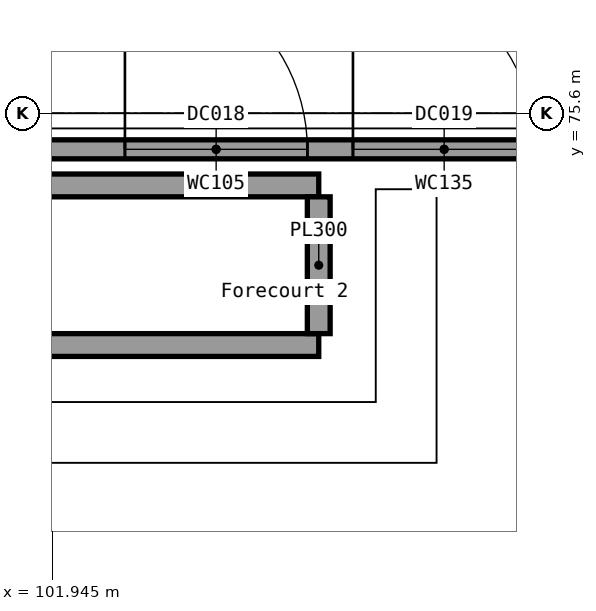
"""IFC4 building model, lengths in metres.
Left out: names, types, materials, properties, quantities, classifications, styles, units other than length and angle.
Written with IfcOpenShell. Run it as: python <this file> out.ifc"""

import sys

from ifc_helpers import new_model, si_unit, direction, frame, frame_2d, origin, place, context, subcontext, project, spatial, rectangle, extrude, element, fill, save


model = new_model("IFC4")
c1 = context("Model", 3, precision=1e-05, world=origin(), true_north=direction((0.0, 1.0)))
c2 = subcontext(c1, "Body", "Model", "MODEL_VIEW")
j1 = project(units=[si_unit("LENGTHUNIT", "METRE"), si_unit("PLANEANGLEUNIT", "RADIAN")], contexts=[c1])
p1 = place(None, origin())
s1 = spatial("IfcSite", under=j1, at=p1, CompositionType="ELEMENT")
p2 = place(p1, origin())
s2 = spatial("IfcBuilding", under=s1, at=p2, CompositionType="ELEMENT")
p3 = place(p2, origin())
s3 = spatial("IfcBuildingStorey", under=s2, at=p3, CompositionType="ELEMENT", Elevation=0.0)
for number, where, z_axis, x_axis in (
    (1, (93.75, 72.55, 0.0), (0.0, 0.0, 1.0), (1.0, 0.0, 0.0)),
    (2, (93.75, 74.65, 0.0), (0.0, 0.0, 1.0), (1.0, 0.0, 0.0)),
):
    element("IfcWall", number, at=place(p3, frame(where, z_axis=z_axis, x_axis=x_axis)), inside=s3, PredefinedType="SOLIDWALL", context=c2, shape_type="SweptSolid", body=[
        extrude(rectangle(XDim=11.7, YDim=0.3, at=frame_2d((5.85, 0.0))), origin(), (0.0, 0.0, 1.0), 0.9),
    ])
p4 = place(p3, frame((105.45, 72.7, 0.0), z_axis=(0.0, 0.0, 1.0), x_axis=(0.0, 1.0, 0.0)))
e3 = element("IfcWall", 3, at=p4, inside=s3, PredefinedType="SOLIDWALL", context=c2, shape_type="SweptSolid", body=[
    extrude(rectangle(XDim=1.8, YDim=0.3, at=frame_2d((0.9, 0.0))), origin(), (0.0, 0.0, 1.0), 0.9),
])
p5 = place(p3, frame((92.4, 75.125, 0.0), z_axis=(0.0, 0.0, 1.0), x_axis=(1.0, 0.0, 0.0)))
e4 = element("IfcWall", 4, at=p5, inside=s3, PredefinedType="SOLIDWALL", context=c2, shape_type="SweptSolid", body=[
    extrude(rectangle(XDim=16.8, YDim=0.25, at=frame_2d((8.4, 0.0))), origin(), (0.0, 0.0, 1.0), 6.0),
])
p6 = place(p5, frame((0.9, 0.0, 0.0)))
e5 = element("IfcOpeningElement", 5, at=p6, cuts=e4, PredefinedType="OPENING", context=c2, shape_type="SweptSolid", body=[
    extrude(rectangle(XDim=2.4, YDim=2.4, at=frame_2d((1.2, 1.2))), frame((0.0, 0.125, 0.0), z_axis=(0.0, -1.0, 0.0), x_axis=(1.0, 0.0, 0.0)), (0.0, 0.0, 1.0), 0.25),
])
p7 = place(p5, frame((0.9, 0.0, 3.0)))
e6 = element("IfcOpeningElement", 6, at=p7, cuts=e4, PredefinedType="OPENING", context=c2, shape_type="SweptSolid", body=[
    extrude(rectangle(XDim=2.4, YDim=2.4, at=frame_2d((1.2, 1.2))), frame((0.0, 0.125, 0.0), z_axis=(0.0, -1.0, 0.0), x_axis=(1.0, 0.0, 0.0)), (0.0, 0.0, 1.0), 0.25),
])
p8 = place(p5, frame((3.9, 0.0, 0.0)))
e7 = element("IfcOpeningElement", 7, at=p8, cuts=e4, PredefinedType="OPENING", context=c2, shape_type="SweptSolid", body=[
    extrude(rectangle(XDim=2.4, YDim=2.4, at=frame_2d((1.2, 1.2))), frame((0.0, 0.125, 0.0), z_axis=(0.0, -1.0, 0.0), x_axis=(1.0, 0.0, 0.0)), (0.0, 0.0, 1.0), 0.25),
])
p9 = place(p5, frame((3.9, 0.0, 3.0)))
e8 = element("IfcOpeningElement", 8, at=p9, cuts=e4, PredefinedType="OPENING", context=c2, shape_type="SweptSolid", body=[
    extrude(rectangle(XDim=2.4, YDim=2.4, at=frame_2d((1.2, 1.2))), frame((0.0, 0.125, 0.0), z_axis=(0.0, -1.0, 0.0), x_axis=(1.0, 0.0, 0.0)), (0.0, 0.0, 1.0), 0.25),
])
p10 = place(p5, frame((10.5, 0.0, 0.0)))
e9 = element("IfcOpeningElement", 9, at=p10, cuts=e4, PredefinedType="OPENING", context=c2, shape_type="SweptSolid", body=[
    extrude(rectangle(XDim=2.4, YDim=2.4, at=frame_2d((1.2, 1.2))), frame((0.0, 0.125, 0.0), z_axis=(0.0, -1.0, 0.0), x_axis=(1.0, 0.0, 0.0)), (0.0, 0.0, 1.0), 0.25),
])
p11 = place(p5, frame((10.5, 0.0, 3.0)))
e10 = element("IfcOpeningElement", 10, at=p11, cuts=e4, PredefinedType="OPENING", context=c2, shape_type="SweptSolid", body=[
    extrude(rectangle(XDim=2.4, YDim=2.4, at=frame_2d((1.2, 1.2))), frame((0.0, 0.125, 0.0), z_axis=(0.0, -1.0, 0.0), x_axis=(1.0, 0.0, 0.0)), (0.0, 0.0, 1.0), 0.25),
])
p12 = place(p5, frame((13.5, 0.0, 0.0)))
e11 = element("IfcOpeningElement", 11, at=p12, cuts=e4, PredefinedType="OPENING", context=c2, shape_type="SweptSolid", body=[
    extrude(rectangle(XDim=2.4, YDim=2.4, at=frame_2d((1.2, 1.2))), frame((0.0, 0.125, 0.0), z_axis=(0.0, -1.0, 0.0), x_axis=(1.0, 0.0, 0.0)), (0.0, 0.0, 1.0), 0.25),
])
p13 = place(p5, frame((13.5, 0.0, 3.0)))
e12 = element("IfcOpeningElement", 12, at=p13, cuts=e4, PredefinedType="OPENING", context=c2, shape_type="SweptSolid", body=[
    extrude(rectangle(XDim=2.4, YDim=2.4, at=frame_2d((1.2, 1.2))), frame((0.0, 0.125, 0.0), z_axis=(0.0, -1.0, 0.0), x_axis=(1.0, 0.0, 0.0)), (0.0, 0.0, 1.0), 0.25),
])
p14 = place(p10, origin())
e13 = element("IfcDoor", 13, at=p14, inside=s3, OperationType="DOUBLE_DOOR_DOUBLE_SWING", PredefinedType="DOOR", context=c2, shape_type="SweptSolid", body=[
    extrude(rectangle(XDim=2.4, YDim=2.4, at=frame_2d((1.2, 1.2))), frame((0.0, 0.025, 0.0), z_axis=(0.0, -1.0, 0.0), x_axis=(1.0, 0.0, 0.0)), (0.0, 0.0, 1.0), 0.05),
])
fill(e9, e13)
p15 = place(p11, origin())
e14 = element("IfcWindow", 14, at=p15, inside=s3, PartitioningType="SINGLE_PANEL", PredefinedType="WINDOW", context=c2, shape_type="SweptSolid", body=[
    extrude(rectangle(XDim=2.4, YDim=2.4, at=frame_2d((1.2, 1.2))), frame((0.0, 0.03, 0.0), z_axis=(0.0, -1.0, 0.0), x_axis=(1.0, 0.0, 0.0)), (0.0, 0.0, 1.0), 0.06),
])
fill(e10, e14)
p16 = place(p12, origin())
e15 = element("IfcDoor", 15, at=p16, inside=s3, OperationType="DOUBLE_DOOR_DOUBLE_SWING", PredefinedType="DOOR", context=c2, shape_type="SweptSolid", body=[
    extrude(rectangle(XDim=2.4, YDim=2.4, at=frame_2d((1.2, 1.2))), frame((0.0, 0.025, 0.0), z_axis=(0.0, -1.0, 0.0), x_axis=(1.0, 0.0, 0.0)), (0.0, 0.0, 1.0), 0.05),
])
fill(e11, e15)
p17 = place(p13, origin())
e16 = element("IfcWindow", 16, at=p17, inside=s3, PartitioningType="SINGLE_PANEL", PredefinedType="WINDOW", context=c2, shape_type="SweptSolid", body=[
    extrude(rectangle(XDim=2.4, YDim=2.4, at=frame_2d((1.2, 1.2))), frame((0.0, 0.03, 0.0), z_axis=(0.0, -1.0, 0.0), x_axis=(1.0, 0.0, 0.0)), (0.0, 0.0, 1.0), 0.06),
])
fill(e12, e16)
save(model, sys.argv[1])
